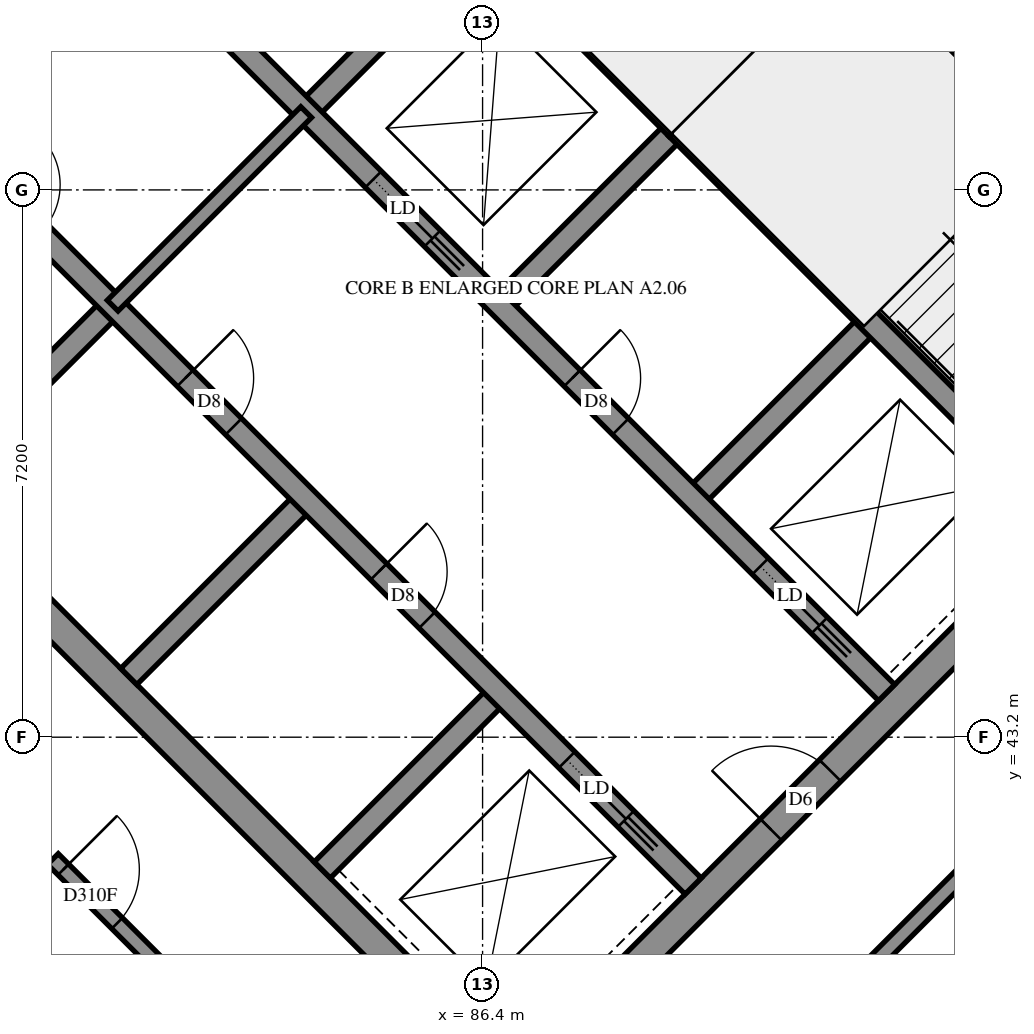
"""IFC4 building model, lengths in metres.
Left out: names, types, materials, properties, quantities, classifications, styles, units other than length and angle.
Written with IfcOpenShell. Run it as: python <this file> out.ifc"""

import sys

from ifc_helpers import new_model, si_unit, direction, frame, frame_2d, origin, place, context, subcontext, project, spatial, rectangle, extrude, element, fill, save


model = new_model("IFC4")
c1 = context("Model", 3, precision=1e-05, world=origin(), true_north=direction((0.0, 1.0)))
c2 = subcontext(c1, "Body", "Model", "MODEL_VIEW")
j1 = project(units=[si_unit("LENGTHUNIT", "METRE"), si_unit("PLANEANGLEUNIT", "RADIAN")], contexts=[c1])
p1 = place(None, origin())
s1 = spatial("IfcSite", under=j1, at=p1, CompositionType="ELEMENT")
p2 = place(p1, origin())
s2 = spatial("IfcBuilding", under=s1, at=p2, CompositionType="ELEMENT")
p3 = place(p2, frame((0.0, 0.0, 260.8)))
s3 = spatial("IfcBuildingStorey", under=s2, at=p3, CompositionType="ELEMENT", Elevation=260.8)
p4 = place(p3, frame((76.23, 49.231, -0.3), z_axis=(0.0, 0.0, 1.0), x_axis=(0.7071034917, -0.7071100706, 0.0)))
e1 = element("IfcWall", 1, at=p4, inside=s3, PredefinedType="SHEAR", context=c2, shape_type="SweptSolid", body=[
    extrude(rectangle(XDim=15.2, YDim=0.4, at=frame_2d((7.6, 0.0))), origin(), (0.0, 0.0, 1.0), 2.7),
])
p5 = place(p3, frame((86.695, 59.696, -0.3), z_axis=(0.0, 0.0, 1.0), x_axis=(0.7071100706, -0.7071034917, 0.0)))
e2 = element("IfcWall", 2, at=p5, inside=s3, PredefinedType="SHEAR", context=c2, shape_type="SweptSolid", body=[
    extrude(rectangle(XDim=15.2, YDim=0.4, at=frame_2d((7.6, 0.0))), origin(), (0.0, 0.0, 1.0), 2.7),
])
p6 = place(p5, frame((10.4, 0.0, 0.3)))
e3 = element("IfcOpeningElement", 3, at=p6, cuts=e2, PredefinedType="OPENING", context=c2, shape_type="SweptSolid", body=[
    extrude(rectangle(XDim=0.8, YDim=2.1, at=frame_2d((0.4, 1.05))), frame((0.0, 0.21, 0.0), z_axis=(0.0, -1.0, 0.0), x_axis=(1.0, 0.0, 0.0)), (0.0, 0.0, 1.0), 0.42),
])
p7 = place(p3, frame((76.513, 49.231, -0.3), z_axis=(0.0, 0.0, 1.0), x_axis=(0.7071067812, 0.7071067812, 0.0)))
e4 = element("IfcWall", 4, at=p7, inside=s3, PredefinedType="SHEAR", context=c2, shape_type="SweptSolid", body=[
    extrude(rectangle(XDim=14.4, YDim=0.4, at=frame_2d((7.2, 0.0))), origin(), (0.0, 0.0, 1.0), 2.7),
])
p8 = place(p7, frame((4.55, 0.0, 0.3)))
e5 = element("IfcOpeningElement", 5, at=p8, cuts=e4, PredefinedType="OPENING", context=c2, shape_type="SweptSolid", body=[
    extrude(rectangle(XDim=1.1, YDim=2.1, at=frame_2d((0.55, 1.05))), frame((0.0, 0.21, 0.0), z_axis=(0.0, -1.0, 0.0), x_axis=(1.0, 0.0, 0.0)), (0.0, 0.0, 1.0), 0.42),
])
p9 = place(p7, frame((11.35, 0.0, 0.3)))
e6 = element("IfcOpeningElement", 6, at=p9, cuts=e4, PredefinedType="OPENING", context=c2, shape_type="SweptSolid", body=[
    extrude(rectangle(XDim=1.1, YDim=2.1, at=frame_2d((0.55, 1.05))), frame((0.0, 0.21, 0.0), z_axis=(0.0, -1.0, 0.0), x_axis=(1.0, 0.0, 0.0)), (0.0, 0.0, 1.0), 0.42),
])
p10 = place(p3, frame((86.978, 38.766, -0.3), z_axis=(0.0, 0.0, 1.0), x_axis=(0.7071067812, 0.7071067812, 0.0)))
e7 = element("IfcWall", 7, at=p10, inside=s3, PredefinedType="SHEAR", context=c2, shape_type="SweptSolid", body=[
    extrude(rectangle(XDim=14.4, YDim=0.4, at=frame_2d((7.2, 0.0))), origin(), (0.0, 0.0, 1.0), 2.7),
])
p11 = place(p10, frame((4.55, 0.0, 0.3)))
e8 = element("IfcOpeningElement", 8, at=p11, cuts=e7, PredefinedType="OPENING", context=c2, shape_type="SweptSolid", body=[
    extrude(rectangle(XDim=1.1, YDim=2.1, at=frame_2d((0.55, 1.05))), frame((0.0, 0.21, 0.0), z_axis=(0.0, -1.0, 0.0), x_axis=(1.0, 0.0, 0.0)), (0.0, 0.0, 1.0), 0.42),
])
p12 = place(p10, frame((11.35, 0.0, 0.3)))
e9 = element("IfcOpeningElement", 9, at=p12, cuts=e7, PredefinedType="OPENING", context=c2, shape_type="SweptSolid", body=[
    extrude(rectangle(XDim=1.1, YDim=2.1, at=frame_2d((0.55, 1.05))), frame((0.0, 0.21, 0.0), z_axis=(0.0, -1.0, 0.0), x_axis=(1.0, 0.0, 0.0)), (0.0, 0.0, 1.0), 0.42),
])
for number, where, z_axis, x_axis in (
    (10, (79.2, 46.544, 0.0), (0.0, 0.0, 1.0), (0.707, 0.707, 0.0)),
    (11, (84.079, 51.423, 0.0), (0.0, 0.0, 1.0), (0.707, 0.707, 0.0)),
):
    element("IfcWall", number, at=place(p3, frame(where, z_axis=z_axis, x_axis=x_axis)), inside=s3, PredefinedType="SOLIDWALL", context=c2, shape_type="SweptSolid", body=[
        extrude(rectangle(XDim=3.3, YDim=0.3, at=frame_2d((1.65, 0.0))), origin(), (0.0, 0.0, 1.0), 3.1),
    ])
p13 = place(p3, frame((81.746, 43.999, 0.0), z_axis=(0.0, 0.0, 1.0), x_axis=(0.7071067812, 0.7071067812, 0.0)))
e12 = element("IfcWall", 12, at=p13, inside=s3, PredefinedType="SOLIDWALL", context=c2, shape_type="SweptSolid", body=[
    extrude(rectangle(XDim=3.3, YDim=0.3, at=frame_2d((1.65, 0.0))), origin(), (0.0, 0.0, 1.0), 3.1),
])
p14 = place(p3, frame((86.625, 48.878, 0.0), z_axis=(0.0, 0.0, 1.0), x_axis=(0.7071067812, 0.7071067812, 0.0)))
e13 = element("IfcWall", 13, at=p14, inside=s3, PredefinedType="SOLIDWALL", context=c2, shape_type="SweptSolid", body=[
    extrude(rectangle(XDim=3.3, YDim=0.3, at=frame_2d((1.65, 0.0))), origin(), (0.0, 0.0, 1.0), 3.1),
])
p15 = place(p3, frame((84.291, 41.453, 0.0), z_axis=(0.0, 0.0, 1.0), x_axis=(0.7071067812, 0.7071067812, 0.0)))
e14 = element("IfcWall", 14, at=p15, inside=s3, PredefinedType="SOLIDWALL", context=c2, shape_type="SweptSolid", body=[
    extrude(rectangle(XDim=3.3, YDim=0.3, at=frame_2d((1.65, 0.0))), origin(), (0.0, 0.0, 1.0), 3.1),
])
p16 = place(p3, frame((89.17, 46.332, 0.0), z_axis=(0.0, 0.0, 1.0), x_axis=(0.7071067812, 0.7071067812, 0.0)))
e15 = element("IfcWall", 15, at=p16, inside=s3, PredefinedType="SOLIDWALL", context=c2, shape_type="SweptSolid", body=[
    extrude(rectangle(XDim=3.3, YDim=0.3, at=frame_2d((1.65, 0.0))), origin(), (0.0, 0.0, 1.0), 3.1),
])
p17 = place(p3, frame((78.988, 51.423, 0.0), z_axis=(0.0, 0.0, 1.0), x_axis=(0.7071067812, -0.7071067812, 0.0)))
e16 = element("IfcWall", 16, at=p17, inside=s3, PredefinedType="SOLIDWALL", context=c2, shape_type="SweptSolid", body=[
    extrude(rectangle(XDim=14.4, YDim=0.3, at=frame_2d((7.2, 0.0))), origin(), (0.0, 0.0, 1.0), 3.1),
])
p18 = place(p17, frame((1.35, 0.0, 0.0)))
e17 = element("IfcOpeningElement", 17, at=p18, cuts=e16, PredefinedType="OPENING", context=c2, shape_type="SweptSolid", body=[
    extrude(rectangle(XDim=0.9, YDim=2.1, at=frame_2d((0.45, 1.05))), frame((0.0, 0.16, 0.0), z_axis=(0.0, -1.0, 0.0), x_axis=(1.0, 0.0, 0.0)), (0.0, 0.0, 1.0), 0.32),
])
p19 = place(p17, frame((4.95, 0.0, 0.0)))
e18 = element("IfcOpeningElement", 18, at=p19, cuts=e16, PredefinedType="OPENING", context=c2, shape_type="SweptSolid", body=[
    extrude(rectangle(XDim=0.9, YDim=2.1, at=frame_2d((0.45, 1.05))), frame((0.0, 0.16, 0.0), z_axis=(0.0, -1.0, 0.0), x_axis=(1.0, 0.0, 0.0)), (0.0, 0.0, 1.0), 0.32),
])
p20 = place(p17, frame((8.55, 0.0, 0.0)))
e19 = element("IfcOpeningElement", 19, at=p20, cuts=e16, PredefinedType="OPENING", context=c2, shape_type="SweptSolid", body=[
    extrude(rectangle(XDim=0.9, YDim=2.1, at=frame_2d((0.45, 1.05))), frame((0.0, 0.16, 0.0), z_axis=(0.0, -1.0, 0.0), x_axis=(1.0, 0.0, 0.0)), (0.0, 0.0, 1.0), 0.32),
])
p21 = place(p17, frame((12.05, 0.0, 0.0)))
e20 = element("IfcOpeningElement", 20, at=p21, cuts=e16, PredefinedType="OPENING", context=c2, shape_type="SweptSolid", body=[
    extrude(rectangle(XDim=1.1, YDim=2.1, at=frame_2d((0.55, 1.05))), frame((0.0, 0.16, 0.0), z_axis=(0.0, -1.0, 0.0), x_axis=(1.0, 0.0, 0.0)), (0.0, 0.0, 1.0), 0.32),
])
p22 = place(p3, frame((81.534, 53.969, 0.0), z_axis=(0.0, 0.0, 1.0), x_axis=(0.707103309, -0.7071102534, 0.0)))
e21 = element("IfcWall", 21, at=p22, inside=s3, PredefinedType="SOLIDWALL", context=c2, shape_type="SweptSolid", body=[
    extrude(rectangle(XDim=14.4, YDim=0.3, at=frame_2d((7.2, 0.0))), origin(), (0.0, 0.0, 1.0), 3.1),
])
p23 = place(p22, frame((8.55, 0.0, 0.0)))
e22 = element("IfcOpeningElement", 22, at=p23, cuts=e21, PredefinedType="OPENING", context=c2, shape_type="SweptSolid", body=[
    extrude(rectangle(XDim=0.9, YDim=2.1, at=frame_2d((0.45, 1.05))), frame((0.0, 0.16, 0.0), z_axis=(0.0, -1.0, 0.0), x_axis=(1.0, 0.0, 0.0)), (0.0, 0.0, 1.0), 0.32),
])
p24 = place(p22, frame((1.25, 0.0, 0.0)))
e23 = element("IfcOpeningElement", 23, at=p24, cuts=e21, PredefinedType="OPENING", context=c2, shape_type="SweptSolid", body=[
    extrude(rectangle(XDim=1.1, YDim=2.1, at=frame_2d((0.55, 1.05))), frame((0.0, 0.16, 0.0), z_axis=(0.0, -1.0, 0.0), x_axis=(1.0, 0.0, 0.0)), (0.0, 0.0, 1.0), 0.32),
])
p25 = place(p22, frame((4.85, 0.0, 0.0)))
e24 = element("IfcOpeningElement", 24, at=p25, cuts=e21, PredefinedType="OPENING", context=c2, shape_type="SweptSolid", body=[
    extrude(rectangle(XDim=1.1, YDim=2.1, at=frame_2d((0.55, 1.05))), frame((0.0, 0.16, 0.0), z_axis=(0.0, -1.0, 0.0), x_axis=(1.0, 0.0, 0.0)), (0.0, 0.0, 1.0), 0.32),
])
p26 = place(p22, frame((12.05, 0.0, 0.0)))
e25 = element("IfcOpeningElement", 25, at=p26, cuts=e21, PredefinedType="OPENING", context=c2, shape_type="SweptSolid", body=[
    extrude(rectangle(XDim=1.1, YDim=2.1, at=frame_2d((0.55, 1.05))), frame((0.0, 0.16, 0.0), z_axis=(0.0, -1.0, 0.0), x_axis=(1.0, 0.0, 0.0)), (0.0, 0.0, 1.0), 0.32),
])
for number, where, z_axis, x_axis in (
    (26, (83.867, 56.302, 0.0), (0.0, 0.0, 1.0), (0.707, -0.707, 0.0)),
    (27, (88.958, 51.211, 0.0), (0.0, 0.0, 1.0), (0.707, -0.707, 0.0)),
):
    element("IfcWall", number, at=place(p3, frame(where, z_axis=z_axis, x_axis=x_axis)), inside=s3, PredefinedType="SOLIDWALL", context=c2, shape_type="SweptSolid", body=[
        extrude(rectangle(XDim=7.2, YDim=0.3, at=frame_2d((3.6, 0.0))), origin(), (0.0, 0.0, 1.0), 3.1),
    ])
p27 = place(p3, frame((88.958, 51.211, 0.0), z_axis=(0.0, 0.0, 1.0), x_axis=(0.7071067812, 0.7071067812, 0.0)))
e28 = element("IfcWall", 28, at=p27, inside=s3, PredefinedType="SOLIDWALL", context=c2, shape_type="SweptSolid", body=[
    extrude(rectangle(XDim=4.2, YDim=0.3, at=frame_2d((2.1, 0.0))), origin(), (0.0, 0.0, 1.0), 3.1),
])
p28 = place(p3, frame((91.313, 53.354, 0.0), z_axis=(0.0, 0.0, 1.0), x_axis=(0.7071140275, -0.7070995348, 0.0)))
e29 = element("IfcWall", 29, at=p28, inside=s3, PredefinedType="PARTITIONING", context=c2, shape_type="SweptSolid", body=[
    extrude(rectangle(XDim=6.9, YDim=0.15, at=frame_2d((3.45, 0.0))), origin(), (0.0, 0.0, 1.0), 3.1),
])
p29 = place(p3, frame((81.534, 48.878, 0.0), z_axis=(0.0, 0.0, 1.0), x_axis=(0.707092892, 0.7071206701, 0.0)))
e30 = element("IfcWall", 30, at=p29, inside=s3, PredefinedType="PARTITIONING", context=c2, shape_type="SweptSolid", body=[
    extrude(rectangle(XDim=3.6, YDim=0.2, at=frame_2d((1.8, 0.0))), origin(), (0.0, 0.0, 1.0), 3.1),
])
p30 = place(p3, frame((84.954, 31.938, 0.0), z_axis=(0.0, 0.0, 1.0), x_axis=(0.7071769042, 0.7070366512, 0.0)))
e31 = element("IfcWall", 31, at=p30, inside=s3, PredefinedType="PARTITIONING", context=c2, shape_type="SweptSolid", body=[
    extrude(rectangle(XDim=14.26, YDim=0.2, at=frame_2d((7.13, 0.0))), origin(), (0.0, 0.0, 1.0), 3.1),
])
p31 = place(p3, frame((86.836, 35.514, 0.0), z_axis=(0.0, 0.0, 1.0), x_axis=(0.7071067812, 0.7071067812, 0.0)))
e32 = element("IfcWall", 32, at=p31, inside=s3, PredefinedType="PARTITIONING", context=c2, shape_type="SweptSolid", body=[
    extrude(rectangle(XDim=10.4, YDim=0.2, at=frame_2d((5.2, 0.0))), origin(), (0.0, 0.0, 1.0), 3.1),
])
p32 = place(p31, frame((9.207, 0.0, 0.0)))
e33 = element("IfcOpeningElement", 33, at=p32, cuts=e32, PredefinedType="OPENING", context=c2, shape_type="SweptSolid", body=[
    extrude(rectangle(XDim=1.0, YDim=2.1, at=frame_2d((0.5, 1.05))), frame((0.0, 0.11, 0.0), z_axis=(0.0, -1.0, 0.0), x_axis=(1.0, 0.0, 0.0)), (0.0, 0.0, 1.0), 0.22),
])
p33 = place(p3, frame((80.747, 41.597, 0.0), z_axis=(0.0, 0.0, 1.0), x_axis=(0.7071067812, -0.7071067812, 0.0)))
e34 = element("IfcWall", 34, at=p33, inside=s3, PredefinedType="PARTITIONING", context=c2, shape_type="SweptSolid", body=[
    extrude(rectangle(XDim=8.607, YDim=0.2, at=frame_2d((4.303, 0.0))), origin(), (0.0, 0.0, 1.0), 3.1),
])
p34 = place(p33, frame((0.195, 0.0, 0.0)))
e35 = element("IfcOpeningElement", 35, at=p34, cuts=e34, PredefinedType="OPENING", context=c2, shape_type="SweptSolid", body=[
    extrude(rectangle(XDim=1.0, YDim=2.1, at=frame_2d((0.5, 1.05))), frame((0.0, 0.11, 0.0), z_axis=(0.0, -1.0, 0.0), x_axis=(1.0, 0.0, 0.0)), (0.0, 0.0, 1.0), 0.22),
])
p35 = place(p33, frame((3.133, 0.0, 0.0)))
e36 = element("IfcOpeningElement", 36, at=p35, cuts=e34, PredefinedType="OPENING", context=c2, shape_type="SweptSolid", body=[
    extrude(rectangle(XDim=1.0, YDim=2.1, at=frame_2d((0.5, 1.05))), frame((0.0, 0.11, 0.0), z_axis=(0.0, -1.0, 0.0), x_axis=(1.0, 0.0, 0.0)), (0.0, 0.0, 1.0), 0.22),
])
p36 = place(p11, origin())
e37 = element("IfcDoor", 37, at=p36, inside=s3, OperationType="DOUBLE_DOOR_SINGLE_SWING", PredefinedType="DOOR", context=c2, shape_type="SweptSolid", body=[
    extrude(rectangle(XDim=1.1, YDim=2.1, at=frame_2d((0.55, 1.05))), frame((0.0, 0.025, 0.0), z_axis=(0.0, -1.0, 0.0), x_axis=(1.0, 0.0, 0.0)), (0.0, 0.0, 1.0), 0.05),
])
fill(e8, e37)
p37 = place(p19, origin())
e38 = element("IfcDoor", 38, at=p37, inside=s3, OperationType="SINGLE_SWING_LEFT", PredefinedType="DOOR", context=c2, shape_type="SweptSolid", body=[
    extrude(rectangle(XDim=0.9, YDim=2.1, at=frame_2d((0.45, 1.05))), frame((0.0, 0.025, 0.0), z_axis=(0.0, -1.0, 0.0), x_axis=(1.0, 0.0, 0.0)), (0.0, 0.0, 1.0), 0.05),
])
fill(e18, e38)
p38 = place(p20, origin())
e39 = element("IfcDoor", 39, at=p38, inside=s3, OperationType="SINGLE_SWING_LEFT", PredefinedType="DOOR", context=c2, shape_type="SweptSolid", body=[
    extrude(rectangle(XDim=0.9, YDim=2.1, at=frame_2d((0.45, 1.05))), frame((0.0, 0.025, 0.0), z_axis=(0.0, -1.0, 0.0), x_axis=(1.0, 0.0, 0.0)), (0.0, 0.0, 1.0), 0.05),
])
fill(e19, e39)
p39 = place(p23, origin())
e40 = element("IfcDoor", 40, at=p39, inside=s3, OperationType="SINGLE_SWING_LEFT", PredefinedType="DOOR", context=c2, shape_type="SweptSolid", body=[
    extrude(rectangle(XDim=0.9, YDim=2.1, at=frame_2d((0.45, 1.05))), frame((0.0, 0.025, 0.0), z_axis=(0.0, -1.0, 0.0), x_axis=(1.0, 0.0, 0.0)), (0.0, 0.0, 1.0), 0.05),
])
fill(e22, e40)
p40 = place(p21, origin())
e41 = element("IfcDoor", 41, at=p40, inside=s3, OperationType="SLIDING_TO_RIGHT", PredefinedType="DOOR", context=c2, shape_type="SweptSolid", body=[
    extrude(rectangle(XDim=1.1, YDim=2.1, at=frame_2d((0.55, 1.05))), frame((0.0, 0.025, 0.0), z_axis=(0.0, -1.0, 0.0), x_axis=(1.0, 0.0, 0.0)), (0.0, 0.0, 1.0), 0.05),
])
fill(e20, e41)
p41 = place(p25, origin())
e42 = element("IfcDoor", 42, at=p41, inside=s3, OperationType="SLIDING_TO_RIGHT", PredefinedType="DOOR", context=c2, shape_type="SweptSolid", body=[
    extrude(rectangle(XDim=1.1, YDim=2.1, at=frame_2d((0.55, 1.05))), frame((0.0, 0.025, 0.0), z_axis=(0.0, -1.0, 0.0), x_axis=(1.0, 0.0, 0.0)), (0.0, 0.0, 1.0), 0.05),
])
fill(e24, e42)
p42 = place(p26, origin())
e43 = element("IfcDoor", 43, at=p42, inside=s3, OperationType="SLIDING_TO_RIGHT", PredefinedType="DOOR", context=c2, shape_type="SweptSolid", body=[
    extrude(rectangle(XDim=1.1, YDim=2.1, at=frame_2d((0.55, 1.05))), frame((0.0, 0.025, 0.0), z_axis=(0.0, -1.0, 0.0), x_axis=(1.0, 0.0, 0.0)), (0.0, 0.0, 1.0), 0.05),
])
fill(e25, e43)
p43 = place(p34, origin())
e44 = element("IfcDoor", 44, at=p43, inside=s3, OperationType="SINGLE_SWING_LEFT", PredefinedType="DOOR", context=c2, shape_type="SweptSolid", body=[
    extrude(rectangle(XDim=1.0, YDim=2.1, at=frame_2d((0.5, 1.05))), frame((0.0, 0.025, 0.0), z_axis=(0.0, -1.0, 0.0), x_axis=(1.0, 0.0, 0.0)), (0.0, 0.0, 1.0), 0.05),
])
fill(e35, e44)
save(model, sys.argv[1])
